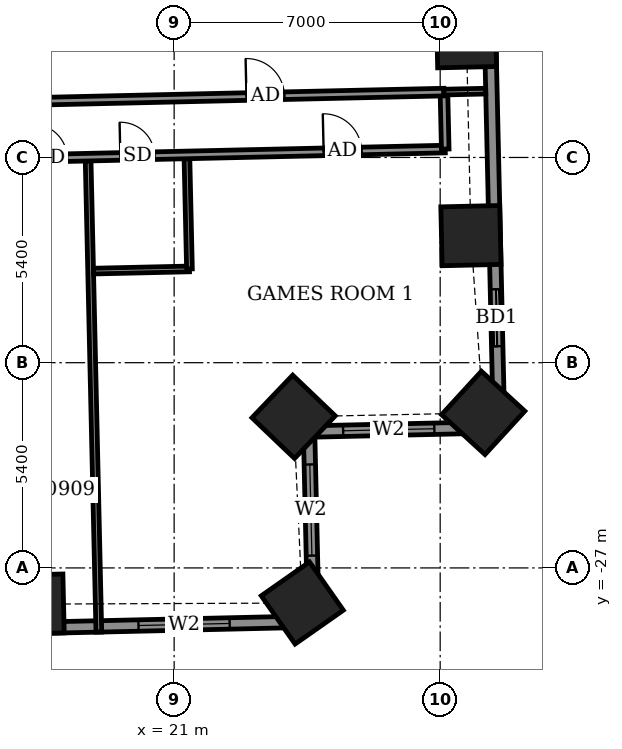
"""IFC4 building model, lengths in metres.
Left out: names, types, materials, properties, quantities, classifications, styles, units other than length and angle.
Written with IfcOpenShell. Run it as: python <this file> out.ifc"""

import sys

from ifc_helpers import new_model, si_unit, direction, frame, frame_2d, origin, origin_2d, place, context, subcontext, project, spatial, rectangle, extrude, element, fill, save


model = new_model("IFC4")
c1 = context("Model", 3, precision=1e-05, world=origin(), true_north=direction((0.0, 1.0)))
c2 = subcontext(c1, "Body", "Model", "MODEL_VIEW")
j1 = project(units=[si_unit("LENGTHUNIT", "METRE"), si_unit("PLANEANGLEUNIT", "RADIAN")], contexts=[c1])
p1 = place(None, origin())
s1 = spatial("IfcSite", under=j1, at=p1, CompositionType="ELEMENT")
p2 = place(p1, origin())
s2 = spatial("IfcBuilding", under=s1, at=p2, CompositionType="ELEMENT")
p3 = place(p2, frame((0.0, 0.0, 41.3)))
s3 = spatial("IfcBuildingStorey", under=s2, at=p3, CompositionType="ELEMENT", Elevation=41.3)
for number, where, z_axis, x_axis in (
    (1, (17.315, -27.952, -0.55), (0.0, 0.0, 1.0), (1.0, 0.023, 0.0)),
    (2, (24.372, -27.923, -0.55), (0.0, 0.0, 1.0), (0.819, 0.574, 0.0)),
    (3, (24.144, -23.024, -0.55), (0.0, 0.0, 1.0), (0.691, 0.723, 0.0)),
    (4, (29.132, -22.921, -0.55), (0.0, 0.0, 1.0), (0.676, 0.737, 0.0)),
    (5, (28.809, -18.257, -0.55), (0.0, 0.0, 1.0), (-0.023, 1.0, 0.0)),
    (6, (28.691, -13.05, -0.55), (0.0, 0.0, 1.0), (-0.023, 1.0, 0.0)),
):
    element("IfcColumn", number, at=place(p3, frame(where, z_axis=z_axis, x_axis=x_axis)), inside=s3, PredefinedType="COLUMN", context=c2, shape_type="SweptSolid", body=[
        extrude(rectangle(XDim=1.55, YDim=1.55, at=origin_2d()), origin(), (0.0, 0.0, 1.0), 3.6),
    ])
p4 = place(p3, frame((29.549, -23.299, 0.0), z_axis=(0.0, 0.0, 1.0), x_axis=(-0.022670336976, 0.999742994885, 0.0)))
e7 = element("IfcWall", 7, at=p4, inside=s3, PredefinedType="SOLIDWALL", context=c2, shape_type="SweptSolid", body=[
    extrude(rectangle(XDim=15.529, YDim=0.3, at=frame_2d((7.765, 0.0))), origin(), (0.0, 0.0, 1.0), 3.05),
])
p5 = place(p4, frame((2.133, 0.0, 0.0)))
e8 = element("IfcOpeningElement", 8, at=p5, cuts=e7, PredefinedType="OPENING", context=c2, shape_type="SweptSolid", body=[
    extrude(rectangle(XDim=1.5, YDim=2.4, at=frame_2d((0.75, 1.2))), frame((0.0, 0.16, 0.0), z_axis=(0.0, -1.0, 0.0), x_axis=(1.0, 0.0, 0.0)), (0.0, 0.0, 1.0), 0.32),
])
p6 = place(p4, frame((11.67, 0.0, 0.9)))
e9 = element("IfcOpeningElement", 9, at=p6, cuts=e7, PredefinedType="OPENING", context=c2, shape_type="SweptSolid", body=[
    extrude(rectangle(XDim=2.4, YDim=1.5, at=frame_2d((1.2, 0.75))), frame((0.0, 0.16, 0.0), z_axis=(0.0, -1.0, 0.0), x_axis=(1.0, 0.0, 0.0)), (0.0, 0.0, 1.0), 0.32),
])
p7 = place(p3, frame((-27.423, -29.593, 0.0), z_axis=(0.0, 0.0, 1.0), x_axis=(0.999742563204, 0.022689365739, 0.0)))
e10 = element("IfcWall", 10, at=p7, inside=s3, PredefinedType="SOLIDWALL", context=c2, shape_type="SweptSolid", body=[
    extrude(rectangle(XDim=52.101, YDim=0.3, at=frame_2d((26.05, 0.0))), origin(), (0.0, 0.0, 1.0), 3.05),
])
p8 = place(p7, frame((2.517, 0.0, 0.0)))
e11 = element("IfcOpeningElement", 11, at=p8, cuts=e10, PredefinedType="OPENING", context=c2, shape_type="SweptSolid", body=[
    extrude(rectangle(XDim=1.5, YDim=2.4, at=frame_2d((0.75, 1.2))), frame((0.0, 0.16, 0.0), z_axis=(0.0, -1.0, 0.0), x_axis=(1.0, 0.0, 0.0)), (0.0, 0.0, 1.0), 0.32),
])
p9 = place(p7, frame((8.356, 0.0, 0.0)))
e12 = element("IfcOpeningElement", 12, at=p9, cuts=e10, PredefinedType="OPENING", context=c2, shape_type="SweptSolid", body=[
    extrude(rectangle(XDim=1.2, YDim=2.4, at=frame_2d((0.6, 1.2))), frame((0.0, 0.16, 0.0), z_axis=(0.0, -1.0, 0.0), x_axis=(1.0, 0.0, 0.0)), (0.0, 0.0, 1.0), 0.32),
])
p10 = place(p7, frame((11.423, 0.0, 0.0)))
e13 = element("IfcOpeningElement", 13, at=p10, cuts=e10, PredefinedType="OPENING", context=c2, shape_type="SweptSolid", body=[
    extrude(rectangle(XDim=1.5, YDim=2.4, at=frame_2d((0.75, 1.2))), frame((0.0, 0.16, 0.0), z_axis=(0.0, -1.0, 0.0), x_axis=(1.0, 0.0, 0.0)), (0.0, 0.0, 1.0), 0.32),
])
p11 = place(p7, frame((16.373, 0.0, 0.0)))
e14 = element("IfcOpeningElement", 14, at=p11, cuts=e10, PredefinedType="OPENING", context=c2, shape_type="SweptSolid", body=[
    extrude(rectangle(XDim=1.5, YDim=2.4, at=frame_2d((0.75, 1.2))), frame((0.0, 0.16, 0.0), z_axis=(0.0, -1.0, 0.0), x_axis=(1.0, 0.0, 0.0)), (0.0, 0.0, 1.0), 0.32),
])
p12 = place(p7, frame((19.591, 0.0, 0.0)))
e15 = element("IfcOpeningElement", 15, at=p12, cuts=e10, PredefinedType="OPENING", context=c2, shape_type="SweptSolid", body=[
    extrude(rectangle(XDim=1.5, YDim=2.4, at=frame_2d((0.75, 1.2))), frame((0.0, 0.16, 0.0), z_axis=(0.0, -1.0, 0.0), x_axis=(1.0, 0.0, 0.0)), (0.0, 0.0, 1.0), 0.32),
])
p13 = place(p7, frame((25.2, 0.0, 0.0)))
e16 = element("IfcOpeningElement", 16, at=p13, cuts=e10, PredefinedType="OPENING", context=c2, shape_type="SweptSolid", body=[
    extrude(rectangle(XDim=1.5, YDim=2.4, at=frame_2d((0.75, 1.2))), frame((0.0, 0.16, 0.0), z_axis=(0.0, -1.0, 0.0), x_axis=(1.0, 0.0, 0.0)), (0.0, 0.0, 1.0), 0.32),
])
p14 = place(p7, frame((30.909, 0.0, 0.0)))
e17 = element("IfcOpeningElement", 17, at=p14, cuts=e10, PredefinedType="OPENING", context=c2, shape_type="SweptSolid", body=[
    extrude(rectangle(XDim=1.5, YDim=2.4, at=frame_2d((0.75, 1.2))), frame((0.0, 0.16, 0.0), z_axis=(0.0, -1.0, 0.0), x_axis=(1.0, 0.0, 0.0)), (0.0, 0.0, 1.0), 0.32),
])
p15 = place(p7, frame((34.127, 0.0, 0.0)))
e18 = element("IfcOpeningElement", 18, at=p15, cuts=e10, PredefinedType="OPENING", context=c2, shape_type="SweptSolid", body=[
    extrude(rectangle(XDim=1.5, YDim=2.4, at=frame_2d((0.75, 1.2))), frame((0.0, 0.16, 0.0), z_axis=(0.0, -1.0, 0.0), x_axis=(1.0, 0.0, 0.0)), (0.0, 0.0, 1.0), 0.32),
])
p16 = place(p7, frame((39.177, 0.0, 0.0)))
e19 = element("IfcOpeningElement", 19, at=p16, cuts=e10, PredefinedType="OPENING", context=c2, shape_type="SweptSolid", body=[
    extrude(rectangle(XDim=1.5, YDim=2.4, at=frame_2d((0.75, 1.2))), frame((0.0, 0.16, 0.0), z_axis=(0.0, -1.0, 0.0), x_axis=(1.0, 0.0, 0.0)), (0.0, 0.0, 1.0), 0.32),
])
p17 = place(p7, frame((42.544, 0.0, 0.0)))
e20 = element("IfcOpeningElement", 20, at=p17, cuts=e10, PredefinedType="OPENING", context=c2, shape_type="SweptSolid", body=[
    extrude(rectangle(XDim=1.2, YDim=2.4, at=frame_2d((0.6, 1.2))), frame((0.0, 0.16, 0.0), z_axis=(0.0, -1.0, 0.0), x_axis=(1.0, 0.0, 0.0)), (0.0, 0.0, 1.0), 0.32),
])
p18 = place(p7, frame((47.497, 0.0, 0.9)))
e21 = element("IfcOpeningElement", 21, at=p18, cuts=e10, PredefinedType="OPENING", context=c2, shape_type="SweptSolid", body=[
    extrude(rectangle(XDim=2.4, YDim=1.5, at=frame_2d((1.2, 0.75))), frame((0.0, 0.16, 0.0), z_axis=(0.0, -1.0, 0.0), x_axis=(1.0, 0.0, 0.0)), (0.0, 0.0, 1.0), 0.32),
])
p19 = place(p3, frame((24.664, -28.411, 0.0), z_axis=(0.0, 0.0, 1.0), x_axis=(-0.022802372469, 0.999739992103, 0.0)))
e22 = element("IfcWall", 22, at=p19, inside=s3, PredefinedType="SOLIDWALL", context=c2, shape_type="SweptSolid", body=[
    extrude(rectangle(XDim=5.0, YDim=0.3, at=frame_2d((2.5, 0.0))), origin(), (0.0, 0.0, 1.0), 2.55),
])
p20 = place(p19, frame((1.735, 0.0, 0.9)))
e23 = element("IfcOpeningElement", 23, at=p20, cuts=e22, PredefinedType="OPENING", context=c2, shape_type="SweptSolid", body=[
    extrude(rectangle(XDim=2.4, YDim=1.5, at=frame_2d((1.2, 0.75))), frame((0.0, 0.16, 0.0), z_axis=(0.0, -1.0, 0.0), x_axis=(1.0, 0.0, 0.0)), (0.0, 0.0, 1.0), 0.32),
])
p21 = place(p3, frame((24.55, -23.412, 0.0), z_axis=(0.0, 0.0, 1.0), x_axis=(0.999744450377, 0.022606059803, 0.0)))
e24 = element("IfcWall", 24, at=p21, inside=s3, PredefinedType="SOLIDWALL", context=c2, shape_type="SweptSolid", body=[
    extrude(rectangle(XDim=5.0, YDim=0.3, at=frame_2d((2.5, 0.0))), origin(), (0.0, 0.0, 1.0), 3.05),
])
p22 = place(p21, frame((0.897, 0.0, 0.9)))
e25 = element("IfcOpeningElement", 25, at=p22, cuts=e24, PredefinedType="OPENING", context=c2, shape_type="SweptSolid", body=[
    extrude(rectangle(XDim=2.4, YDim=1.5, at=frame_2d((1.2, 0.75))), frame((0.0, 0.16, 0.0), z_axis=(0.0, -1.0, 0.0), x_axis=(1.0, 0.0, 0.0)), (0.0, 0.0, 1.0), 0.32),
])
p23 = place(p3, frame((31.002, -23.416, 0.0), z_axis=(0.0, 0.0, 1.0), x_axis=(-0.022810139511, 0.99973981492, 0.0)))
e26 = element("IfcWall", 26, at=p23, inside=s3, PredefinedType="USERDEFINED", context=c2, shape_type="SweptSolid", body=[
    extrude(rectangle(XDim=3.5, YDim=0.55, at=frame_2d((1.75, 0.0))), origin(), (0.0, 0.0, 1.0), 0.8),
])
p24 = place(p3, frame((19.019, -28.689, 0.0), z_axis=(0.0, 0.0, 1.0), x_axis=(-0.022740189192, 0.999741408463, 0.0)))
e27 = element("IfcWall", 27, at=p24, inside=s3, PredefinedType="PARTITIONING", context=c2, shape_type="SweptSolid", body=[
    extrude(rectangle(XDim=12.4, YDim=0.15, at=frame_2d((6.2, 0.0))), origin(), (0.0, 0.0, 1.0), 2.55),
])
p25 = place(p3, frame((18.878, -19.19, 0.0), z_axis=(0.0, 0.0, 1.0), x_axis=(0.999746356616, 0.022521599255, 0.0)))
e28 = element("IfcWall", 28, at=p25, inside=s3, PredefinedType="PARTITIONING", context=c2, shape_type="SweptSolid", body=[
    extrude(rectangle(XDim=2.526, YDim=0.15, at=frame_2d((1.263, 0.0))), origin(), (0.0, 0.0, 1.0), 3.05),
])
p26 = place(p3, frame((21.403, -19.133, 0.0), z_axis=(0.0, 0.0, 1.0), x_axis=(-0.022807433839, 0.999739876649, 0.0)))
e29 = element("IfcWall", 29, at=p26, inside=s3, PredefinedType="PARTITIONING", context=c2, shape_type="SweptSolid", body=[
    extrude(rectangle(XDim=2.901, YDim=0.15, at=frame_2d((1.45, 0.0))), origin(), (0.0, 0.0, 1.0), 3.05),
])
p27 = place(p3, frame((-30.652, -17.313, 0.0), z_axis=(0.0, 0.0, 1.0), x_axis=(0.999742623764, 0.02268669719, 0.0)))
e30 = element("IfcWall", 30, at=p27, inside=s3, PredefinedType="PARTITIONING", context=c2, shape_type="SweptSolid", body=[
    extrude(rectangle(XDim=58.8, YDim=0.2, at=frame_2d((29.4, 0.0))), origin(), (0.0, 0.0, 1.0), 3.05),
])
p28 = place(p27, frame((3.406, 0.0, 0.0)))
e31 = element("IfcOpeningElement", 31, at=p28, cuts=e30, PredefinedType="OPENING", context=c2, shape_type="SweptSolid", body=[
    extrude(rectangle(XDim=1.0, YDim=2.1, at=frame_2d((0.5, 1.05))), frame((0.0, 0.11, 0.0), z_axis=(0.0, -1.0, 0.0), x_axis=(1.0, 0.0, 0.0)), (0.0, 0.0, 1.0), 0.22),
])
p29 = place(p27, frame((11.475, 0.0, 0.0)))
e32 = element("IfcOpeningElement", 32, at=p29, cuts=e30, PredefinedType="OPENING", context=c2, shape_type="SweptSolid", body=[
    extrude(rectangle(XDim=0.9, YDim=2.1, at=frame_2d((0.45, 1.05))), frame((0.0, 0.11, 0.0), z_axis=(0.0, -1.0, 0.0), x_axis=(1.0, 0.0, 0.0)), (0.0, 0.0, 1.0), 0.22),
])
p30 = place(p27, frame((13.55, 0.0, 0.0)))
e33 = element("IfcOpeningElement", 33, at=p30, cuts=e30, PredefinedType="OPENING", context=c2, shape_type="SweptSolid", body=[
    extrude(rectangle(XDim=0.9, YDim=2.1, at=frame_2d((0.45, 1.05))), frame((0.0, 0.11, 0.0), z_axis=(0.0, -1.0, 0.0), x_axis=(1.0, 0.0, 0.0)), (0.0, 0.0, 1.0), 0.22),
])
p31 = place(p27, frame((20.375, 0.0, 0.0)))
e34 = element("IfcOpeningElement", 34, at=p31, cuts=e30, PredefinedType="OPENING", context=c2, shape_type="SweptSolid", body=[
    extrude(rectangle(XDim=0.9, YDim=2.1, at=frame_2d((0.45, 1.05))), frame((0.0, 0.11, 0.0), z_axis=(0.0, -1.0, 0.0), x_axis=(1.0, 0.0, 0.0)), (0.0, 0.0, 1.0), 0.22),
])
p32 = place(p27, frame((22.625, 0.0, 0.0)))
e35 = element("IfcOpeningElement", 35, at=p32, cuts=e30, PredefinedType="OPENING", context=c2, shape_type="SweptSolid", body=[
    extrude(rectangle(XDim=0.9, YDim=2.1, at=frame_2d((0.45, 1.05))), frame((0.0, 0.11, 0.0), z_axis=(0.0, -1.0, 0.0), x_axis=(1.0, 0.0, 0.0)), (0.0, 0.0, 1.0), 0.22),
])
p33 = place(p27, frame((29.65, 0.0, 0.0)))
e36 = element("IfcOpeningElement", 36, at=p33, cuts=e30, PredefinedType="OPENING", context=c2, shape_type="SweptSolid", body=[
    extrude(rectangle(XDim=0.9, YDim=2.1, at=frame_2d((0.45, 1.05))), frame((0.0, 0.11, 0.0), z_axis=(0.0, -1.0, 0.0), x_axis=(1.0, 0.0, 0.0)), (0.0, 0.0, 1.0), 0.22),
])
p34 = place(p27, frame((31.875, 0.0, 0.0)))
e37 = element("IfcOpeningElement", 37, at=p34, cuts=e30, PredefinedType="OPENING", context=c2, shape_type="SweptSolid", body=[
    extrude(rectangle(XDim=0.9, YDim=2.1, at=frame_2d((0.45, 1.05))), frame((0.0, 0.11, 0.0), z_axis=(0.0, -1.0, 0.0), x_axis=(1.0, 0.0, 0.0)), (0.0, 0.0, 1.0), 0.22),
])
p35 = place(p27, frame((38.9, 0.0, 0.0)))
e38 = element("IfcOpeningElement", 38, at=p35, cuts=e30, PredefinedType="OPENING", context=c2, shape_type="SweptSolid", body=[
    extrude(rectangle(XDim=0.9, YDim=2.1, at=frame_2d((0.45, 1.05))), frame((0.0, 0.11, 0.0), z_axis=(0.0, -1.0, 0.0), x_axis=(1.0, 0.0, 0.0)), (0.0, 0.0, 1.0), 0.22),
])
p36 = place(p27, frame((41.025, 0.0, 0.0)))
e39 = element("IfcOpeningElement", 39, at=p36, cuts=e30, PredefinedType="OPENING", context=c2, shape_type="SweptSolid", body=[
    extrude(rectangle(XDim=0.9, YDim=2.1, at=frame_2d((0.45, 1.05))), frame((0.0, 0.11, 0.0), z_axis=(0.0, -1.0, 0.0), x_axis=(1.0, 0.0, 0.0)), (0.0, 0.0, 1.0), 0.22),
])
p37 = place(p27, frame((47.95, 0.0, 0.0)))
e40 = element("IfcOpeningElement", 40, at=p37, cuts=e30, PredefinedType="OPENING", context=c2, shape_type="SweptSolid", body=[
    extrude(rectangle(XDim=0.9, YDim=2.1, at=frame_2d((0.45, 1.05))), frame((0.0, 0.11, 0.0), z_axis=(0.0, -1.0, 0.0), x_axis=(1.0, 0.0, 0.0)), (0.0, 0.0, 1.0), 0.22),
])
p38 = place(p27, frame((55.6, 0.0, 0.0)))
e41 = element("IfcOpeningElement", 41, at=p38, cuts=e30, PredefinedType="OPENING", context=c2, shape_type="SweptSolid", body=[
    extrude(rectangle(XDim=1.0, YDim=2.1, at=frame_2d((0.5, 1.05))), frame((0.0, 0.11, 0.0), z_axis=(0.0, -1.0, 0.0), x_axis=(1.0, 0.0, 0.0)), (0.0, 0.0, 1.0), 0.22),
])
p39 = place(p27, frame((50.25, 0.0, 0.0)))
e42 = element("IfcOpeningElement", 42, at=p39, cuts=e30, PredefinedType="OPENING", context=c2, shape_type="SweptSolid", body=[
    extrude(rectangle(XDim=0.9, YDim=2.1, at=frame_2d((0.45, 1.05))), frame((0.0, 0.11, 0.0), z_axis=(0.0, -1.0, 0.0), x_axis=(1.0, 0.0, 0.0)), (0.0, 0.0, 1.0), 0.22),
])
p40 = place(p3, frame((28.133, -15.979, 0.0), z_axis=(0.0, 0.0, 1.0), x_axis=(-0.022632637625, 0.99974384905, 0.0)))
e43 = element("IfcWall", 43, at=p40, inside=s3, PredefinedType="PARTITIONING", context=c2, shape_type="SweptSolid", body=[
    extrude(rectangle(XDim=1.5, YDim=0.2, at=frame_2d((0.75, 0.0))), origin(), (0.0, 0.0, 1.0), 3.05),
])
p41 = place(p3, frame((17.306, -14.724, 0.0), z_axis=(0.0, 0.0, 1.0), x_axis=(0.999744269809, 0.022614043969, 0.0)))
e44 = element("IfcWall", 44, at=p41, inside=s3, PredefinedType="PARTITIONING", context=c2, shape_type="SweptSolid", body=[
    extrude(rectangle(XDim=10.796, YDim=0.2, at=frame_2d((5.398, 0.0))), origin(), (0.0, 0.0, 1.0), 3.05),
])
p42 = place(p41, frame((5.598, 0.0, 0.0)))
e45 = element("IfcOpeningElement", 45, at=p42, cuts=e44, PredefinedType="OPENING", context=c2, shape_type="SweptSolid", body=[
    extrude(rectangle(XDim=1.0, YDim=2.1, at=frame_2d((0.5, 1.05))), frame((0.0, 0.11, 0.0), z_axis=(0.0, -1.0, 0.0), x_axis=(1.0, 0.0, 0.0)), (0.0, 0.0, 1.0), 0.22),
])
p43 = place(p3, frame((28.095, -14.48, 0.0), z_axis=(0.0, 0.0, 1.0), x_axis=(0.999745251335, 0.022570609924, 0.0)))
e46 = element("IfcWall", 46, at=p43, inside=s3, PredefinedType="PARTITIONING", context=c2, shape_type="SweptSolid", body=[
    extrude(rectangle(XDim=1.103, YDim=0.15, at=frame_2d((0.552, 0.0))), origin(), (0.0, 0.0, 1.0), 2.55),
])
p44 = place(p5, origin())
e47 = element("IfcDoor", 47, at=p44, inside=s3, OperationType="SLIDING_TO_LEFT", PredefinedType="DOOR", context=c2, shape_type="SweptSolid", body=[
    extrude(rectangle(XDim=1.5, YDim=2.4, at=frame_2d((0.75, 1.2))), frame((0.0, 0.025, 0.0), z_axis=(0.0, -1.0, 0.0), x_axis=(1.0, 0.0, 0.0)), (0.0, 0.0, 1.0), 0.05),
])
fill(e8, e47)
p45 = place(p18, origin())
e48 = element("IfcWindow", 48, at=p45, inside=s3, PartitioningType="DOUBLE_PANEL_VERTICAL", PredefinedType="WINDOW", context=c2, shape_type="SweptSolid", body=[
    extrude(rectangle(XDim=2.4, YDim=1.5, at=frame_2d((1.2, 0.75))), frame((0.0, 0.03, 0.0), z_axis=(0.0, -1.0, 0.0), x_axis=(1.0, 0.0, 0.0)), (0.0, 0.0, 1.0), 0.06),
])
fill(e21, e48)
p46 = place(p20, origin())
e49 = element("IfcWindow", 49, at=p46, inside=s3, PartitioningType="DOUBLE_PANEL_VERTICAL", PredefinedType="WINDOW", context=c2, shape_type="SweptSolid", body=[
    extrude(rectangle(XDim=2.4, YDim=1.5, at=frame_2d((1.2, 0.75))), frame((0.0, 0.03, 0.0), z_axis=(0.0, -1.0, 0.0), x_axis=(1.0, 0.0, 0.0)), (0.0, 0.0, 1.0), 0.06),
])
fill(e23, e49)
p47 = place(p22, origin())
e50 = element("IfcWindow", 50, at=p47, inside=s3, PartitioningType="DOUBLE_PANEL_VERTICAL", PredefinedType="WINDOW", context=c2, shape_type="SweptSolid", body=[
    extrude(rectangle(XDim=2.4, YDim=1.5, at=frame_2d((1.2, 0.75))), frame((0.0, 0.03, 0.0), z_axis=(0.0, -1.0, 0.0), x_axis=(1.0, 0.0, 0.0)), (0.0, 0.0, 1.0), 0.06),
])
fill(e25, e50)
p48 = place(p37, origin())
e51 = element("IfcDoor", 51, at=p48, inside=s3, OperationType="SINGLE_SWING_LEFT", PredefinedType="DOOR", context=c2, shape_type="SweptSolid", body=[
    extrude(rectangle(XDim=0.9, YDim=2.1, at=frame_2d((0.45, 1.05))), frame((0.0, 0.025, 0.0), z_axis=(0.0, -1.0, 0.0), x_axis=(1.0, 0.0, 0.0)), (0.0, 0.0, 1.0), 0.05),
])
fill(e40, e51)
p49 = place(p38, origin())
e52 = element("IfcDoor", 52, at=p49, inside=s3, OperationType="SINGLE_SWING_RIGHT", PredefinedType="DOOR", context=c2, shape_type="SweptSolid", body=[
    extrude(rectangle(XDim=1.0, YDim=2.1, at=frame_2d((0.5, 1.05))), frame((0.0, 0.025, 0.0), z_axis=(0.0, -1.0, 0.0), x_axis=(1.0, 0.0, 0.0)), (0.0, 0.0, 1.0), 0.05),
])
fill(e41, e52)
p50 = place(p39, origin())
e53 = element("IfcDoor", 53, at=p50, inside=s3, OperationType="SINGLE_SWING_LEFT", PredefinedType="DOOR", context=c2, shape_type="SweptSolid", body=[
    extrude(rectangle(XDim=0.9, YDim=2.1, at=frame_2d((0.45, 1.05))), frame((0.0, 0.025, 0.0), z_axis=(0.0, -1.0, 0.0), x_axis=(1.0, 0.0, 0.0)), (0.0, 0.0, 1.0), 0.05),
])
fill(e42, e53)
p51 = place(p42, origin())
e54 = element("IfcDoor", 54, at=p51, inside=s3, OperationType="SINGLE_SWING_LEFT", PredefinedType="DOOR", context=c2, shape_type="SweptSolid", body=[
    extrude(rectangle(XDim=1.0, YDim=2.1, at=frame_2d((0.5, 1.05))), frame((0.0, 0.025, 0.0), z_axis=(0.0, -1.0, 0.0), x_axis=(1.0, 0.0, 0.0)), (0.0, 0.0, 1.0), 0.05),
])
fill(e45, e54)
save(model, sys.argv[1])
